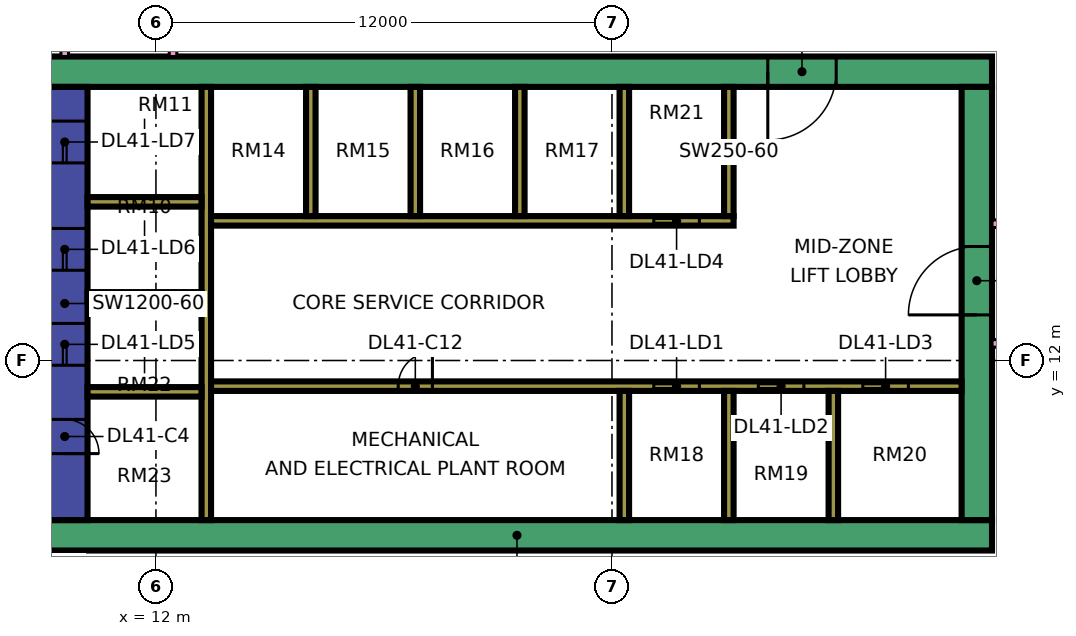
"""IFC4 building model, lengths in metres.
Left out: names, types, materials, properties, quantities, classifications, styles, units other than length and angle.
Written with IfcOpenShell. Run it as: python <this file> out.ifc"""

import sys

from ifc_helpers import new_model, si_unit, direction, frame, frame_2d, origin, place, context, subcontext, project, spatial, rectangle, extrude, element, fill, save


model = new_model("IFC4")
c1 = context("Model", 3, precision=1e-05, world=origin(), true_north=direction((0.0, 1.0)))
c2 = subcontext(c1, "Body", "Model", "MODEL_VIEW")
j1 = project(units=[si_unit("LENGTHUNIT", "METRE"), si_unit("PLANEANGLEUNIT", "RADIAN")], contexts=[c1])
p1 = place(None, origin())
s1 = spatial("IfcSite", under=j1, at=p1, CompositionType="ELEMENT")
p2 = place(p1, origin())
s2 = spatial("IfcBuilding", under=s1, at=p2, CompositionType="ELEMENT")
p3 = place(p2, frame((0.0, 0.0, 179.9)))
s3 = spatial("IfcBuildingStorey", under=s2, at=p3, CompositionType="ELEMENT", Elevation=179.9)
p4 = place(p3, frame((9.0, 7.4, 0.0), z_axis=(0.0, 0.0, 1.0), x_axis=(1.0, 0.0, 0.0)))
e1 = element("IfcWall", 1, at=p4, inside=s3, PredefinedType="SHEAR", context=c2, shape_type="SweptSolid", body=[
    extrude(rectangle(XDim=25.0, YDim=0.8, at=frame_2d((12.5, 0.0))), origin(), (0.0, 0.0, 1.0), 3.75),
])
p5 = place(p3, frame((9.0, 19.6, 0.0), z_axis=(0.0, 0.0, 1.0), x_axis=(1.0, 0.0, 0.0)))
e2 = element("IfcWall", 2, at=p5, inside=s3, PredefinedType="SHEAR", context=c2, shape_type="SweptSolid", body=[
    extrude(rectangle(XDim=25.0, YDim=0.8, at=frame_2d((12.5, 0.0))), origin(), (0.0, 0.0, 1.0), 3.75),
])
p6 = place(p5, frame((19.1, 0.0, 0.0)))
e3 = element("IfcOpeningElement", 3, at=p6, cuts=e2, PredefinedType="OPENING", context=c2, shape_type="SweptSolid", body=[
    extrude(rectangle(XDim=1.8, YDim=2.4, at=frame_2d((0.9, 1.2))), frame((0.0, 0.41, 0.0), z_axis=(0.0, -1.0, 0.0), x_axis=(1.0, 0.0, 0.0)), (0.0, 0.0, 1.0), 0.82),
])
p7 = place(p3, frame((9.6, 7.8, 0.0), z_axis=(0.0, 0.0, 1.0), x_axis=(0.0, 1.0, 0.0)))
e4 = element("IfcWall", 4, at=p7, inside=s3, PredefinedType="SHEAR", context=c2, shape_type="SweptSolid", body=[
    extrude(rectangle(XDim=11.4, YDim=1.2, at=frame_2d((5.7, 0.0))), origin(), (0.0, 0.0, 1.0), 3.75),
])
p8 = place(p7, frame((4.075, 0.0, 0.0)))
e5 = element("IfcOpeningElement", 5, at=p8, cuts=e4, PredefinedType="OPENING", context=c2, shape_type="SweptSolid", body=[
    extrude(rectangle(XDim=1.1, YDim=2.2, at=frame_2d((0.55, 1.1))), frame((0.0, 0.61, 0.0), z_axis=(0.0, -1.0, 0.0), x_axis=(1.0, 0.0, 0.0)), (0.0, 0.0, 1.0), 1.22),
])
p9 = place(p7, frame((6.575, 0.0, 0.0)))
e6 = element("IfcOpeningElement", 6, at=p9, cuts=e4, PredefinedType="OPENING", context=c2, shape_type="SweptSolid", body=[
    extrude(rectangle(XDim=1.1, YDim=2.2, at=frame_2d((0.55, 1.1))), frame((0.0, 0.61, 0.0), z_axis=(0.0, -1.0, 0.0), x_axis=(1.0, 0.0, 0.0)), (0.0, 0.0, 1.0), 1.22),
])
p10 = place(p7, frame((9.4, 0.0, 0.0)))
e7 = element("IfcOpeningElement", 7, at=p10, cuts=e4, PredefinedType="OPENING", context=c2, shape_type="SweptSolid", body=[
    extrude(rectangle(XDim=1.1, YDim=2.2, at=frame_2d((0.55, 1.1))), frame((0.0, 0.61, 0.0), z_axis=(0.0, -1.0, 0.0), x_axis=(1.0, 0.0, 0.0)), (0.0, 0.0, 1.0), 1.22),
])
p11 = place(p7, frame((1.75, 0.0, 0.0)))
e8 = element("IfcOpeningElement", 8, at=p11, cuts=e4, PredefinedType="OPENING", context=c2, shape_type="SweptSolid", body=[
    extrude(rectangle(XDim=0.9, YDim=2.1, at=frame_2d((0.45, 1.05))), frame((0.0, 0.61, 0.0), z_axis=(0.0, -1.0, 0.0), x_axis=(1.0, 0.0, 0.0)), (0.0, 0.0, 1.0), 1.22),
])
p12 = place(p3, frame((33.6, 7.8, 0.0), z_axis=(0.0, 0.0, 1.0), x_axis=(0.0, 1.0, 0.0)))
e9 = element("IfcWall", 9, at=p12, inside=s3, PredefinedType="SHEAR", context=c2, shape_type="SweptSolid", body=[
    extrude(rectangle(XDim=11.4, YDim=0.8, at=frame_2d((5.7, 0.0))), origin(), (0.0, 0.0, 1.0), 3.75),
])
p13 = place(p12, frame((5.4, 0.0, 0.0)))
e10 = element("IfcOpeningElement", 10, at=p13, cuts=e9, PredefinedType="OPENING", context=c2, shape_type="SweptSolid", body=[
    extrude(rectangle(XDim=1.8, YDim=2.4, at=frame_2d((0.9, 1.2))), frame((0.0, 0.41, 0.0), z_axis=(0.0, -1.0, 0.0), x_axis=(1.0, 0.0, 0.0)), (0.0, 0.0, 1.0), 0.82),
])
p14 = place(p3, frame((13.325, 7.8, 0.0), z_axis=(0.0, 0.0, 1.0), x_axis=(0.0, 1.0, 0.0)))
e11 = element("IfcWall", 11, at=p14, inside=s3, PredefinedType="SHEAR", context=c2, shape_type="SweptSolid", body=[
    extrude(rectangle(XDim=11.4, YDim=0.25, at=frame_2d((5.7, 0.0))), origin(), (0.0, 0.0, 1.0), 3.75),
])
p15 = place(p3, frame((13.45, 11.325, 0.0), z_axis=(0.0, 0.0, 1.0), x_axis=(1.0, 0.0, 0.0)))
e12 = element("IfcWall", 12, at=p15, inside=s3, PredefinedType="SHEAR", context=c2, shape_type="SweptSolid", body=[
    extrude(rectangle(XDim=19.75, YDim=0.25, at=frame_2d((9.875, 0.0))), origin(), (0.0, 0.0, 1.0), 3.75),
])
p16 = place(p15, frame((11.65, 0.0, 0.0)))
e13 = element("IfcOpeningElement", 13, at=p16, cuts=e12, PredefinedType="OPENING", context=c2, shape_type="SweptSolid", body=[
    extrude(rectangle(XDim=1.2, YDim=2.2, at=frame_2d((0.6, 1.1))), frame((0.0, 0.135, 0.0), z_axis=(0.0, -1.0, 0.0), x_axis=(1.0, 0.0, 0.0)), (0.0, 0.0, 1.0), 0.27),
])
p17 = place(p15, frame((14.4, 0.0, 0.0)))
e14 = element("IfcOpeningElement", 14, at=p17, cuts=e12, PredefinedType="OPENING", context=c2, shape_type="SweptSolid", body=[
    extrude(rectangle(XDim=1.2, YDim=2.2, at=frame_2d((0.6, 1.1))), frame((0.0, 0.135, 0.0), z_axis=(0.0, -1.0, 0.0), x_axis=(1.0, 0.0, 0.0)), (0.0, 0.0, 1.0), 0.27),
])
p18 = place(p15, frame((17.15, 0.0, 0.0)))
e15 = element("IfcOpeningElement", 15, at=p18, cuts=e12, PredefinedType="OPENING", context=c2, shape_type="SweptSolid", body=[
    extrude(rectangle(XDim=1.2, YDim=2.2, at=frame_2d((0.6, 1.1))), frame((0.0, 0.135, 0.0), z_axis=(0.0, -1.0, 0.0), x_axis=(1.0, 0.0, 0.0)), (0.0, 0.0, 1.0), 0.27),
])
p19 = place(p15, frame((4.925, 0.0, 0.0)))
e16 = element("IfcOpeningElement", 16, at=p19, cuts=e12, PredefinedType="OPENING", context=c2, shape_type="SweptSolid", body=[
    extrude(rectangle(XDim=0.9, YDim=2.1, at=frame_2d((0.45, 1.05))), frame((0.0, 0.135, 0.0), z_axis=(0.0, -1.0, 0.0), x_axis=(1.0, 0.0, 0.0)), (0.0, 0.0, 1.0), 0.27),
])
p20 = place(p3, frame((13.45, 15.675, 0.0), z_axis=(0.0, 0.0, 1.0), x_axis=(1.0, 0.0, 0.0)))
e17 = element("IfcWall", 17, at=p20, inside=s3, PredefinedType="SHEAR", context=c2, shape_type="SweptSolid", body=[
    extrude(rectangle(XDim=13.75, YDim=0.25, at=frame_2d((6.875, 0.0))), origin(), (0.0, 0.0, 1.0), 3.75),
])
p21 = place(p20, frame((11.65, 0.0, 0.0)))
e18 = element("IfcOpeningElement", 18, at=p21, cuts=e17, PredefinedType="OPENING", context=c2, shape_type="SweptSolid", body=[
    extrude(rectangle(XDim=1.2, YDim=2.2, at=frame_2d((0.6, 1.1))), frame((0.0, 0.135, 0.0), z_axis=(0.0, -1.0, 0.0), x_axis=(1.0, 0.0, 0.0)), (0.0, 0.0, 1.0), 0.27),
])
for number, where, z_axis, x_axis in (
    (19, (10.2, 11.175, 0.0), (0.0, 0.0, 1.0), (1.0, 0.0, 0.0)),
    (20, (10.2, 13.675, 0.0), (0.0, 0.0, 1.0), (1.0, 0.0, 0.0)),
    (21, (10.2, 16.175, 0.0), (0.0, 0.0, 1.0), (1.0, 0.0, 0.0)),
):
    element("IfcWall", number, at=place(p3, frame(where, z_axis=z_axis, x_axis=x_axis)), inside=s3, PredefinedType="SHEAR", context=c2, shape_type="SweptSolid", body=[
        extrude(rectangle(XDim=3.0, YDim=0.25, at=frame_2d((1.5, 0.0))), origin(), (0.0, 0.0, 1.0), 3.75),
    ])
for number, where, z_axis, x_axis in (
    (22, (24.325, 7.8, 0.0), (0.0, 0.0, 1.0), (0.0, 1.0, 0.0)),
    (23, (27.075, 7.8, 0.0), (0.0, 0.0, 1.0), (0.0, 1.0, 0.0)),
    (24, (29.825, 7.8, 0.0), (0.0, 0.0, 1.0), (0.0, 1.0, 0.0)),
    (25, (16.075, 15.8, 0.0), (0.0, 0.0, 1.0), (0.0, 1.0, 0.0)),
    (26, (18.825, 15.8, 0.0), (0.0, 0.0, 1.0), (0.0, 1.0, 0.0)),
    (27, (21.575, 15.8, 0.0), (0.0, 0.0, 1.0), (0.0, 1.0, 0.0)),
    (28, (24.325, 15.8, 0.0), (0.0, 0.0, 1.0), (0.0, 1.0, 0.0)),
    (29, (27.075, 15.8, 0.0), (0.0, 0.0, 1.0), (0.0, 1.0, 0.0)),
):
    element("IfcWall", number, at=place(p3, frame(where, z_axis=z_axis, x_axis=x_axis)), inside=s3, PredefinedType="SHEAR", context=c2, shape_type="SweptSolid", body=[
        extrude(rectangle(XDim=3.4, YDim=0.25, at=frame_2d((1.7, 0.0))), origin(), (0.0, 0.0, 1.0), 3.75),
    ])
p22 = place(p3, frame((-1.447, 12.553, 0.0), z_axis=(0.0, 0.0, 1.0), x_axis=(0.707106781187, -0.707106781187, 0.0)))
e30 = element("IfcWall", 30, at=p22, inside=s3, PredefinedType="SOLIDWALL", context=c2, shape_type="SweptSolid", body=[
    extrude(rectangle(XDim=19.799, YDim=0.15, at=frame_2d((9.899, 0.0))), origin(), (0.0, 0.0, 1.0), 3.35),
])
p23 = place(p22, frame((2.212, 0.0, 0.45)))
e31 = element("IfcOpeningElement", 31, at=p23, cuts=e30, PredefinedType="OPENING", context=c2, shape_type="SweptSolid", body=[
    extrude(rectangle(XDim=3.0, YDim=2.4, at=frame_2d((1.5, 1.2))), frame((0.0, 0.085, 0.0), z_axis=(0.0, -1.0, 0.0), x_axis=(1.0, 0.0, 0.0)), (0.0, 0.0, 1.0), 0.17),
])
p24 = place(p22, frame((10.216, 0.0, 0.45)))
e32 = element("IfcOpeningElement", 32, at=p24, cuts=e30, PredefinedType="OPENING", context=c2, shape_type="SweptSolid", body=[
    extrude(rectangle(XDim=3.0, YDim=2.4, at=frame_2d((1.5, 1.2))), frame((0.0, 0.085, 0.0), z_axis=(0.0, -1.0, 0.0), x_axis=(1.0, 0.0, 0.0)), (0.0, 0.0, 1.0), 0.17),
])
p25 = place(p3, frame((9.6, 20.0, 0.0), z_axis=(0.0, 0.0, 1.0), x_axis=(0.0, 1.0, 0.0)))
e33 = element("IfcWall", 33, at=p25, inside=s3, PredefinedType="PARTITIONING", context=c2, shape_type="SweptSolid", body=[
    extrude(rectangle(XDim=44.35, YDim=0.2, at=frame_2d((22.175, 0.0))), origin(), (0.0, 0.0, 1.0), 3.35),
])
p26 = place(p25, frame((16.8, 0.0, 0.0)))
e34 = element("IfcOpeningElement", 34, at=p26, cuts=e33, PredefinedType="OPENING", context=c2, shape_type="SweptSolid", body=[
    extrude(rectangle(XDim=1.0, YDim=2.1, at=frame_2d((0.5, 1.05))), frame((0.0, 0.11, 0.0), z_axis=(0.0, -1.0, 0.0), x_axis=(1.0, 0.0, 0.0)), (0.0, 0.0, 1.0), 0.22),
])
p27 = place(p25, frame((40.65, 0.0, 0.0)))
e35 = element("IfcOpeningElement", 35, at=p27, cuts=e33, PredefinedType="OPENING", context=c2, shape_type="SweptSolid", body=[
    extrude(rectangle(XDim=1.0, YDim=2.1, at=frame_2d((0.5, 1.05))), frame((0.0, 0.11, 0.0), z_axis=(0.0, -1.0, 0.0), x_axis=(1.0, 0.0, 0.0)), (0.0, 0.0, 1.0), 0.22),
])
p28 = place(p25, frame((0.6, 0.0, 0.0)))
e36 = element("IfcOpeningElement", 36, at=p28, cuts=e33, PredefinedType="OPENING", context=c2, shape_type="SweptSolid", body=[
    extrude(rectangle(XDim=1.2, YDim=2.1, at=frame_2d((0.6, 1.05))), frame((0.0, 0.11, 0.0), z_axis=(0.0, -1.0, 0.0), x_axis=(1.0, 0.0, 0.0)), (0.0, 0.0, 1.0), 0.22),
])
p29 = place(p25, frame((4.2, 0.0, 0.0)))
e37 = element("IfcOpeningElement", 37, at=p29, cuts=e33, PredefinedType="OPENING", context=c2, shape_type="SweptSolid", body=[
    extrude(rectangle(XDim=1.0, YDim=2.1, at=frame_2d((0.5, 1.05))), frame((0.0, 0.11, 0.0), z_axis=(0.0, -1.0, 0.0), x_axis=(1.0, 0.0, 0.0)), (0.0, 0.0, 1.0), 0.22),
])
p30 = place(p3, frame((12.45, 20.0, 0.0), z_axis=(0.0, 0.0, 1.0), x_axis=(0.0, 1.0, 0.0)))
e38 = element("IfcWall", 38, at=p30, inside=s3, PredefinedType="PARTITIONING", context=c2, shape_type="SweptSolid", body=[
    extrude(rectangle(XDim=42.926, YDim=0.2, at=frame_2d((21.463, 0.0))), origin(), (0.0, 0.0, 1.0), 3.35),
])
p31 = place(p30, frame((5.95, 0.0, 0.0)))
e39 = element("IfcOpeningElement", 39, at=p31, cuts=e38, PredefinedType="OPENING", context=c2, shape_type="SweptSolid", body=[
    extrude(rectangle(XDim=1.0, YDim=2.1, at=frame_2d((0.5, 1.05))), frame((0.0, 0.11, 0.0), z_axis=(0.0, -1.0, 0.0), x_axis=(1.0, 0.0, 0.0)), (0.0, 0.0, 1.0), 0.22),
])
p32 = place(p30, frame((12.0, 0.0, 0.0)))
e40 = element("IfcOpeningElement", 40, at=p32, cuts=e38, PredefinedType="OPENING", context=c2, shape_type="SweptSolid", body=[
    extrude(rectangle(XDim=1.0, YDim=2.1, at=frame_2d((0.5, 1.05))), frame((0.0, 0.11, 0.0), z_axis=(0.0, -1.0, 0.0), x_axis=(1.0, 0.0, 0.0)), (0.0, 0.0, 1.0), 0.22),
])
p33 = place(p30, frame((16.9, 0.0, 0.0)))
e41 = element("IfcOpeningElement", 41, at=p33, cuts=e38, PredefinedType="OPENING", context=c2, shape_type="SweptSolid", body=[
    extrude(rectangle(XDim=1.0, YDim=2.1, at=frame_2d((0.5, 1.05))), frame((0.0, 0.11, 0.0), z_axis=(0.0, -1.0, 0.0), x_axis=(1.0, 0.0, 0.0)), (0.0, 0.0, 1.0), 0.22),
])
p34 = place(p30, frame((34.9, 0.0, 0.0)))
e42 = element("IfcOpeningElement", 42, at=p34, cuts=e38, PredefinedType="OPENING", context=c2, shape_type="SweptSolid", body=[
    extrude(rectangle(XDim=1.0, YDim=2.1, at=frame_2d((0.5, 1.05))), frame((0.0, 0.11, 0.0), z_axis=(0.0, -1.0, 0.0), x_axis=(1.0, 0.0, 0.0)), (0.0, 0.0, 1.0), 0.22),
])
p35 = place(p30, frame((1.15, 0.0, 0.0)))
e43 = element("IfcOpeningElement", 43, at=p35, cuts=e38, PredefinedType="OPENING", context=c2, shape_type="SweptSolid", body=[
    extrude(rectangle(XDim=1.8, YDim=2.1, at=frame_2d((0.9, 1.05))), frame((0.0, 0.11, 0.0), z_axis=(0.0, -1.0, 0.0), x_axis=(1.0, 0.0, 0.0)), (0.0, 0.0, 1.0), 0.22),
])
p36 = place(p30, frame((28.6, 0.0, 0.0)))
e44 = element("IfcOpeningElement", 44, at=p36, cuts=e38, PredefinedType="OPENING", context=c2, shape_type="SweptSolid", body=[
    extrude(rectangle(XDim=1.8, YDim=2.1, at=frame_2d((0.9, 1.05))), frame((0.0, 0.11, 0.0), z_axis=(0.0, -1.0, 0.0), x_axis=(1.0, 0.0, 0.0)), (0.0, 0.0, 1.0), 0.22),
])
p37 = place(p3, frame((34.0, 12.45, 0.0), z_axis=(0.0, 0.0, 1.0), x_axis=(1.0, 0.0, 0.0)))
e45 = element("IfcWall", 45, at=p37, inside=s3, PredefinedType="PARTITIONING", context=c2, shape_type="SweptSolid", body=[
    extrude(rectangle(XDim=2.451, YDim=0.2, at=frame_2d((1.226, 0.0))), origin(), (0.0, 0.0, 1.0), 3.35),
])
p38 = place(p3, frame((34.0, 15.6, 0.0), z_axis=(0.0, 0.0, 1.0), x_axis=(1.0, 0.0, 0.0)))
e46 = element("IfcWall", 46, at=p38, inside=s3, PredefinedType="PARTITIONING", context=c2, shape_type="SweptSolid", body=[
    extrude(rectangle(XDim=10.35, YDim=0.2, at=frame_2d((5.175, 0.0))), origin(), (0.0, 0.0, 1.0), 3.35),
])
p39 = place(p38, frame((5.6, 0.0, 0.0)))
e47 = element("IfcOpeningElement", 47, at=p39, cuts=e46, PredefinedType="OPENING", context=c2, shape_type="SweptSolid", body=[
    extrude(rectangle(XDim=1.0, YDim=2.1, at=frame_2d((0.5, 1.05))), frame((0.0, 0.11, 0.0), z_axis=(0.0, -1.0, 0.0), x_axis=(1.0, 0.0, 0.0)), (0.0, 0.0, 1.0), 0.22),
])
p40 = place(p38, frame((0.45, 0.0, 0.0)))
e48 = element("IfcOpeningElement", 48, at=p40, cuts=e46, PredefinedType="OPENING", context=c2, shape_type="SweptSolid", body=[
    extrude(rectangle(XDim=1.2, YDim=2.1, at=frame_2d((0.6, 1.05))), frame((0.0, 0.11, 0.0), z_axis=(0.0, -1.0, 0.0), x_axis=(1.0, 0.0, 0.0)), (0.0, 0.0, 1.0), 0.22),
])
p41 = place(p16, origin())
e49 = element("IfcDoor", 49, at=p41, inside=s3, OperationType="DOUBLE_DOOR_SLIDING", PredefinedType="DOOR", context=c2, shape_type="SweptSolid", body=[
    extrude(rectangle(XDim=1.2, YDim=2.2, at=frame_2d((0.6, 1.1))), frame((0.0, 0.025, 0.0), z_axis=(0.0, -1.0, 0.0), x_axis=(1.0, 0.0, 0.0)), (0.0, 0.0, 1.0), 0.05),
])
fill(e13, e49)
p42 = place(p17, origin())
e50 = element("IfcDoor", 50, at=p42, inside=s3, OperationType="DOUBLE_DOOR_SLIDING", PredefinedType="DOOR", context=c2, shape_type="SweptSolid", body=[
    extrude(rectangle(XDim=1.2, YDim=2.2, at=frame_2d((0.6, 1.1))), frame((0.0, 0.025, 0.0), z_axis=(0.0, -1.0, 0.0), x_axis=(1.0, 0.0, 0.0)), (0.0, 0.0, 1.0), 0.05),
])
fill(e14, e50)
p43 = place(p18, origin())
e51 = element("IfcDoor", 51, at=p43, inside=s3, OperationType="DOUBLE_DOOR_SLIDING", PredefinedType="DOOR", context=c2, shape_type="SweptSolid", body=[
    extrude(rectangle(XDim=1.2, YDim=2.2, at=frame_2d((0.6, 1.1))), frame((0.0, 0.025, 0.0), z_axis=(0.0, -1.0, 0.0), x_axis=(1.0, 0.0, 0.0)), (0.0, 0.0, 1.0), 0.05),
])
fill(e15, e51)
p44 = place(p21, origin())
e52 = element("IfcDoor", 52, at=p44, inside=s3, OperationType="DOUBLE_DOOR_SLIDING", PredefinedType="DOOR", context=c2, shape_type="SweptSolid", body=[
    extrude(rectangle(XDim=1.2, YDim=2.2, at=frame_2d((0.6, 1.1))), frame((0.0, 0.025, 0.0), z_axis=(0.0, -1.0, 0.0), x_axis=(1.0, 0.0, 0.0)), (0.0, 0.0, 1.0), 0.05),
])
fill(e18, e52)
p45 = place(p8, origin())
e53 = element("IfcDoor", 53, at=p45, inside=s3, OperationType="DOUBLE_DOOR_SLIDING", PredefinedType="DOOR", context=c2, shape_type="SweptSolid", body=[
    extrude(rectangle(XDim=1.1, YDim=2.2, at=frame_2d((0.55, 1.1))), frame((0.0, 0.025, 0.0), z_axis=(0.0, -1.0, 0.0), x_axis=(1.0, 0.0, 0.0)), (0.0, 0.0, 1.0), 0.05),
])
fill(e5, e53)
p46 = place(p9, origin())
e54 = element("IfcDoor", 54, at=p46, inside=s3, OperationType="DOUBLE_DOOR_SLIDING", PredefinedType="DOOR", context=c2, shape_type="SweptSolid", body=[
    extrude(rectangle(XDim=1.1, YDim=2.2, at=frame_2d((0.55, 1.1))), frame((0.0, 0.025, 0.0), z_axis=(0.0, -1.0, 0.0), x_axis=(1.0, 0.0, 0.0)), (0.0, 0.0, 1.0), 0.05),
])
fill(e6, e54)
p47 = place(p10, origin())
e55 = element("IfcDoor", 55, at=p47, inside=s3, OperationType="DOUBLE_DOOR_SLIDING", PredefinedType="DOOR", context=c2, shape_type="SweptSolid", body=[
    extrude(rectangle(XDim=1.1, YDim=2.2, at=frame_2d((0.55, 1.1))), frame((0.0, 0.025, 0.0), z_axis=(0.0, -1.0, 0.0), x_axis=(1.0, 0.0, 0.0)), (0.0, 0.0, 1.0), 0.05),
])
fill(e7, e55)
p48 = place(p13, origin())
e56 = element("IfcDoor", 56, at=p48, inside=s3, OperationType="DOUBLE_DOOR_SINGLE_SWING", PredefinedType="DOOR", context=c2, shape_type="SweptSolid", body=[
    extrude(rectangle(XDim=1.8, YDim=2.4, at=frame_2d((0.9, 1.2))), frame((0.0, 0.025, 0.0), z_axis=(0.0, -1.0, 0.0), x_axis=(1.0, 0.0, 0.0)), (0.0, 0.0, 1.0), 0.05),
])
fill(e10, e56)
p49 = place(p6, frame((1.8, 0.0, 0.0), z_axis=(0.0, 0.0, 1.0), x_axis=(-1.0, 0.0, 0.0)))
e57 = element("IfcDoor", 57, at=p49, inside=s3, OperationType="DOUBLE_DOOR_SINGLE_SWING", PredefinedType="DOOR", context=c2, shape_type="SweptSolid", body=[
    extrude(rectangle(XDim=1.8, YDim=2.4, at=frame_2d((0.9, 1.2))), frame((0.0, 0.025, 0.0), z_axis=(0.0, -1.0, 0.0), x_axis=(1.0, 0.0, 0.0)), (0.0, 0.0, 1.0), 0.05),
])
fill(e3, e57)
p50 = place(p11, frame((0.9, 0.0, 0.0), z_axis=(0.0, 0.0, 1.0), x_axis=(-1.0, 0.0, 0.0)))
e58 = element("IfcDoor", 58, at=p50, inside=s3, OperationType="SINGLE_SWING_LEFT", PredefinedType="DOOR", context=c2, shape_type="SweptSolid", body=[
    extrude(rectangle(XDim=0.9, YDim=2.1, at=frame_2d((0.45, 1.05))), frame((0.0, 0.025, 0.0), z_axis=(0.0, -1.0, 0.0), x_axis=(1.0, 0.0, 0.0)), (0.0, 0.0, 1.0), 0.05),
])
fill(e8, e58)
p51 = place(p19, frame((0.9, 0.0, 0.0), z_axis=(0.0, 0.0, 1.0), x_axis=(-1.0, 0.0, 0.0)))
e59 = element("IfcDoor", 59, at=p51, inside=s3, OperationType="SINGLE_SWING_RIGHT", PredefinedType="DOOR", context=c2, shape_type="SweptSolid", body=[
    extrude(rectangle(XDim=0.9, YDim=2.1, at=frame_2d((0.45, 1.05))), frame((0.0, 0.025, 0.0), z_axis=(0.0, -1.0, 0.0), x_axis=(1.0, 0.0, 0.0)), (0.0, 0.0, 1.0), 0.05),
])
fill(e16, e59)
save(model, sys.argv[1])
